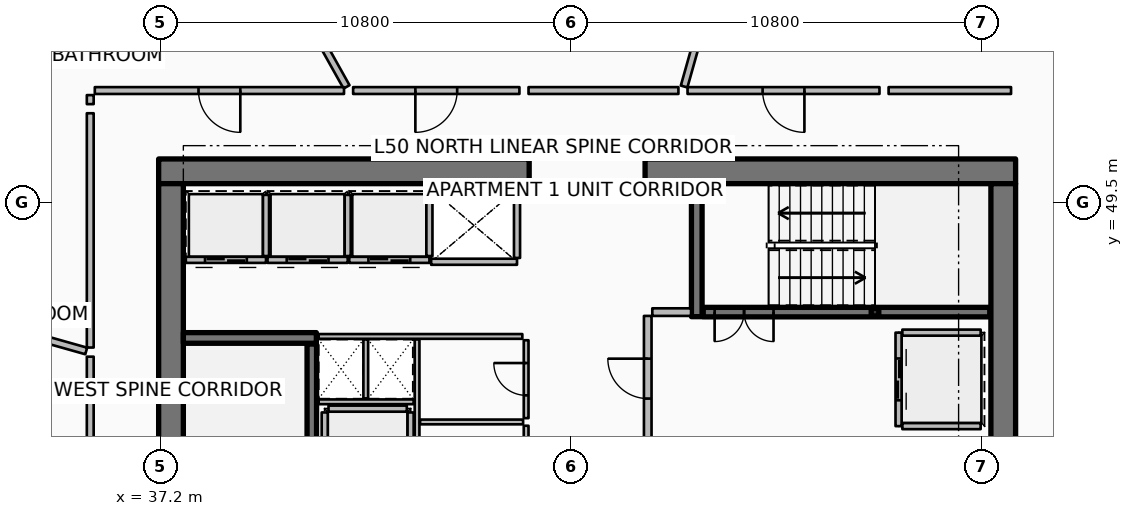
"""IFC4 building model, lengths in metres.
Left out: names, types, materials, properties, quantities, classifications, styles, units other than length and angle.
Written with IfcOpenShell. Run it as: python <this file> out.ifc"""

import sys

from ifc_helpers import new_model, si_unit, direction, frame, frame_2d, origin, origin_2d, place, context, subcontext, project, spatial, rectangle, hollow_rectangle, extrude, element, fill, save


model = new_model("IFC4")
c1 = context("Model", 3, precision=1e-05, world=origin(), true_north=direction((0.0, 1.0)))
c2 = subcontext(c1, "Body", "Model", "MODEL_VIEW")
j1 = project(units=[si_unit("LENGTHUNIT", "METRE"), si_unit("PLANEANGLEUNIT", "RADIAN")], contexts=[c1])
p1 = place(None, origin())
s1 = spatial("IfcSite", under=j1, at=p1, CompositionType="ELEMENT")
p2 = place(p1, origin())
s2 = spatial("IfcBuilding", under=s1, at=p2, CompositionType="ELEMENT")
p3 = place(p2, frame((0.0, 0.0, 199.05)))
s3 = spatial("IfcBuildingStorey", under=s2, at=p3, CompositionType="ELEMENT", Elevation=199.05)
for number, where, z_axis, x_axis in (
    (1, (37.15, 50.325, 0.0), (0.0, 0.0, 1.0), (1.0, 0.0, 0.0)),
    (2, (49.95, 50.325, 0.0), (0.0, 0.0, 1.0), (1.0, 0.0, 0.0)),
):
    element("IfcWall", number, at=place(p3, frame(where, z_axis=z_axis, x_axis=x_axis)), inside=s3, PredefinedType="SHEAR", context=c2, shape_type="SweptSolid", body=[
        extrude(rectangle(XDim=9.75, YDim=0.65, at=frame_2d((4.875, 0.0))), origin(), (0.0, 0.0, 1.0), 3.75),
    ])
for number, where, z_axis, x_axis in (
    (3, (37.475, 34.0, 0.0), (0.0, 0.0, 1.0), (0.0, 1.0, 0.0)),
    (4, (59.375, 34.0, 0.0), (0.0, 0.0, 1.0), (0.0, 1.0, 0.0)),
):
    element("IfcWall", number, at=place(p3, frame(where, z_axis=z_axis, x_axis=x_axis)), inside=s3, PredefinedType="SHEAR", context=c2, shape_type="SweptSolid", body=[
        extrude(rectangle(XDim=16.0, YDim=0.65, at=frame_2d((8.0, 0.0))), origin(), (0.0, 0.0, 1.0), 3.75),
    ])
for number, where, z_axis, x_axis in (
    (5, (37.8, 45.94, 0.0), (0.0, 0.0, 1.0), (1.0, 0.0, 0.0)),
    (6, (51.31, 46.5, 0.0), (0.0, 0.0, 1.0), (0.0, 1.0, 0.0)),
):
    element("IfcWall", number, at=place(p3, frame(where, z_axis=z_axis, x_axis=x_axis)), inside=s3, PredefinedType="SHEAR", context=c2, shape_type="SweptSolid", body=[
        extrude(rectangle(XDim=3.5, YDim=0.28, at=frame_2d((1.75, 0.0))), origin(), (0.0, 0.0, 1.0), 3.75),
    ])
p4 = place(p3, frame((56.0, 46.62, 0.0), z_axis=(0.0, 0.0, 1.0), x_axis=(1.0, 0.0, 0.0)))
e7 = element("IfcColumn", 7, at=p4, inside=s3, PredefinedType="COLUMN", context=c2, shape_type="SweptSolid", body=[
    extrude(hollow_rectangle(XDim=0.2, YDim=0.2, WallThickness=0.01, InnerFilletRadius=0.01, OuterFilletRadius=0.02, at=origin_2d()), origin(), (0.0, 0.0, 1.0), 1.67),
])
p5 = place(p3, frame((41.18, 38.22, 0.0), z_axis=(0.0, 0.0, 1.0), x_axis=(0.0, 1.0, 0.0)))
e8 = element("IfcWall", 8, at=p5, inside=s3, PredefinedType="SOLIDWALL", context=c2, shape_type="SweptSolid", body=[
    extrude(rectangle(XDim=7.56, YDim=0.25, at=frame_2d((3.78, 0.0))), origin(), (0.0, 0.0, 1.0), 3.5),
])
p6 = place(p5, frame((0.3, 0.0, 0.0)))
e9 = element("IfcOpeningElement", 9, at=p6, cuts=e8, PredefinedType="OPENING", context=c2, shape_type="SweptSolid", body=[
    extrude(rectangle(XDim=1.55, YDim=2.15, at=frame_2d((0.775, 1.075))), frame((0.0, 0.135, 0.0), z_axis=(0.0, -1.0, 0.0), x_axis=(1.0, 0.0, 0.0)), (0.0, 0.0, 1.0), 0.27),
])
p7 = place(p3, frame((51.48, 46.62, 0.0), z_axis=(0.0, 0.0, 1.0), x_axis=(1.0, 0.0, 0.0)))
e10 = element("IfcWall", 10, at=p7, inside=s3, PredefinedType="SOLIDWALL", context=c2, shape_type="SweptSolid", body=[
    extrude(rectangle(XDim=7.54, YDim=0.25, at=frame_2d((3.77, 0.0))), origin(), (0.0, 0.0, 1.0), 3.5),
])
p8 = place(p7, frame((0.3, 0.0, 0.0)))
e11 = element("IfcOpeningElement", 11, at=p8, cuts=e10, PredefinedType="OPENING", context=c2, shape_type="SweptSolid", body=[
    extrude(rectangle(XDim=1.55, YDim=2.15, at=frame_2d((0.775, 1.075))), frame((0.0, 0.135, 0.0), z_axis=(0.0, -1.0, 0.0), x_axis=(1.0, 0.0, 0.0)), (0.0, 0.0, 1.0), 0.27),
])
p9 = place(p3, frame((39.975, 47.995, 0.0), z_axis=(0.0, 0.0, 1.0), x_axis=(-1.0, 0.0, 0.0)))
e12 = element("IfcWall", 12, at=p9, inside=s3, PredefinedType="PARTITIONING", context=c2, shape_type="SweptSolid", body=[
    extrude(rectangle(XDim=2.11, YDim=0.16, at=frame_2d((1.055, 0.0))), origin(), (0.0, 0.0, 1.0), 3.5),
])
p10 = place(p9, frame((0.505, 0.0, 0.0)))
e13 = element("IfcOpeningElement", 13, at=p10, cuts=e12, PredefinedType="OPENING", context=c2, shape_type="SweptSolid", body=[
    extrude(rectangle(XDim=1.1, YDim=2.1, at=frame_2d((0.55, 1.05))), frame((0.0, 0.09, 0.0), z_axis=(0.0, -1.0, 0.0), x_axis=(1.0, 0.0, 0.0)), (0.0, 0.0, 1.0), 0.18),
])
p11 = place(p3, frame((39.975, 48.095, 0.0), z_axis=(0.0, 0.0, 1.0), x_axis=(0.0, 1.0, 0.0)))
e14 = element("IfcWall", 14, at=p11, inside=s3, PredefinedType="PARTITIONING", context=c2, shape_type="SweptSolid", body=[
    extrude(rectangle(XDim=1.61, YDim=0.16, at=frame_2d((0.805, 0.0))), origin(), (0.0, 0.0, 1.0), 3.5),
])
p12 = place(p3, frame((42.125, 47.995, 0.0), z_axis=(0.0, 0.0, 1.0), x_axis=(-1.0, 0.0, 0.0)))
e15 = element("IfcWall", 15, at=p12, inside=s3, PredefinedType="PARTITIONING", context=c2, shape_type="SweptSolid", body=[
    extrude(rectangle(XDim=2.11, YDim=0.16, at=frame_2d((1.055, 0.0))), origin(), (0.0, 0.0, 1.0), 3.5),
])
p13 = place(p12, frame((0.505, 0.0, 0.0)))
e16 = element("IfcOpeningElement", 16, at=p13, cuts=e15, PredefinedType="OPENING", context=c2, shape_type="SweptSolid", body=[
    extrude(rectangle(XDim=1.1, YDim=2.1, at=frame_2d((0.55, 1.05))), frame((0.0, 0.09, 0.0), z_axis=(0.0, -1.0, 0.0), x_axis=(1.0, 0.0, 0.0)), (0.0, 0.0, 1.0), 0.18),
])
p14 = place(p3, frame((42.125, 48.095, 0.0), z_axis=(0.0, 0.0, 1.0), x_axis=(0.0, 1.0, 0.0)))
e17 = element("IfcWall", 17, at=p14, inside=s3, PredefinedType="PARTITIONING", context=c2, shape_type="SweptSolid", body=[
    extrude(rectangle(XDim=1.61, YDim=0.16, at=frame_2d((0.805, 0.0))), origin(), (0.0, 0.0, 1.0), 3.5),
])
p15 = place(p3, frame((44.275, 47.995, 0.0), z_axis=(0.0, 0.0, 1.0), x_axis=(-1.0, 0.0, 0.0)))
e18 = element("IfcWall", 18, at=p15, inside=s3, PredefinedType="PARTITIONING", context=c2, shape_type="SweptSolid", body=[
    extrude(rectangle(XDim=2.11, YDim=0.16, at=frame_2d((1.055, 0.0))), origin(), (0.0, 0.0, 1.0), 3.5),
])
p16 = place(p15, frame((0.505, 0.0, 0.0)))
e19 = element("IfcOpeningElement", 19, at=p16, cuts=e18, PredefinedType="OPENING", context=c2, shape_type="SweptSolid", body=[
    extrude(rectangle(XDim=1.1, YDim=2.1, at=frame_2d((0.55, 1.05))), frame((0.0, 0.09, 0.0), z_axis=(0.0, -1.0, 0.0), x_axis=(1.0, 0.0, 0.0)), (0.0, 0.0, 1.0), 0.18),
])
p17 = place(p3, frame((44.275, 48.095, 0.0), z_axis=(0.0, 0.0, 1.0), x_axis=(0.0, 1.0, 0.0)))
e20 = element("IfcWall", 20, at=p17, inside=s3, PredefinedType="PARTITIONING", context=c2, shape_type="SweptSolid", body=[
    extrude(rectangle(XDim=1.61, YDim=0.16, at=frame_2d((0.805, 0.0))), origin(), (0.0, 0.0, 1.0), 3.5),
])
p18 = place(p3, frame((46.58, 47.945, 0.0), z_axis=(0.0, 0.0, 1.0), x_axis=(-1.0, 0.0, 0.0)))
e21 = element("IfcWall", 21, at=p18, inside=s3, PredefinedType="PARTITIONING", context=c2, shape_type="SweptSolid", body=[
    extrude(rectangle(XDim=2.26, YDim=0.16, at=frame_2d((1.13, 0.0))), origin(), (0.0, 0.0, 1.0), 3.5),
])
p19 = place(p3, frame((46.58, 48.045, 0.0), z_axis=(0.0, 0.0, 1.0), x_axis=(0.0, 1.0, 0.0)))
e22 = element("IfcWall", 22, at=p19, inside=s3, PredefinedType="PARTITIONING", context=c2, shape_type="SweptSolid", body=[
    extrude(rectangle(XDim=1.71, YDim=0.16, at=frame_2d((0.855, 0.0))), origin(), (0.0, 0.0, 1.0), 3.5),
])
for number, where, z_axis, x_axis in (
    (23, (43.78, 41.72, 0.0), (0.0, 0.0, 1.0), (0.0, 1.0, 0.0)),
    (24, (41.52, 41.72, 0.0), (0.0, 0.0, 1.0), (0.0, 1.0, 0.0)),
):
    element("IfcWall", number, at=place(p3, frame(where, z_axis=z_axis, x_axis=x_axis)), inside=s3, PredefinedType="PARTITIONING", context=c2, shape_type="SweptSolid", body=[
        extrude(rectangle(XDim=2.26, YDim=0.16, at=frame_2d((1.13, 0.0))), origin(), (0.0, 0.0, 1.0), 3.5),
    ])
p20 = place(p3, frame((41.62, 44.08, 0.0), z_axis=(0.0, 0.0, 1.0), x_axis=(1.0, 0.0, 0.0)))
e25 = element("IfcWall", 25, at=p20, inside=s3, PredefinedType="PARTITIONING", context=c2, shape_type="SweptSolid", body=[
    extrude(rectangle(XDim=2.06, YDim=0.16, at=frame_2d((1.03, 0.0))), origin(), (0.0, 0.0, 1.0), 3.5),
])
p21 = place(p3, frame((56.62, 46.08, 0.0), z_axis=(0.0, 0.0, 1.0), x_axis=(0.0, -1.0, 0.0)))
e26 = element("IfcWall", 26, at=p21, inside=s3, PredefinedType="PARTITIONING", context=c2, shape_type="SweptSolid", body=[
    extrude(rectangle(XDim=2.46, YDim=0.16, at=frame_2d((1.23, 0.0))), origin(), (0.0, 0.0, 1.0), 3.5),
])
p22 = place(p21, frame((0.68, 0.0, 0.0)))
e27 = element("IfcOpeningElement", 27, at=p22, cuts=e26, PredefinedType="OPENING", context=c2, shape_type="SweptSolid", body=[
    extrude(rectangle(XDim=1.1, YDim=2.1, at=frame_2d((0.55, 1.05))), frame((0.0, 0.09, 0.0), z_axis=(0.0, -1.0, 0.0), x_axis=(1.0, 0.0, 0.0)), (0.0, 0.0, 1.0), 0.18),
])
for number, where, z_axis, x_axis in (
    (28, (56.72, 46.08, 0.0), (0.0, 0.0, 1.0), (1.0, 0.0, 0.0)),
    (29, (56.72, 43.62, 0.0), (0.0, 0.0, 1.0), (1.0, 0.0, 0.0)),
):
    element("IfcWall", number, at=place(p3, frame(where, z_axis=z_axis, x_axis=x_axis)), inside=s3, PredefinedType="PARTITIONING", context=c2, shape_type="SweptSolid", body=[
        extrude(rectangle(XDim=2.06, YDim=0.16, at=frame_2d((1.03, 0.0))), origin(), (0.0, 0.0, 1.0), 3.5),
    ])
p23 = place(p3, frame((50.14, 46.62, 0.0), z_axis=(0.0, 0.0, 1.0), x_axis=(1.0, 0.0, 0.0)))
e30 = element("IfcWall", 30, at=p23, inside=s3, PredefinedType="PARTITIONING", context=c2, shape_type="SweptSolid", body=[
    extrude(rectangle(XDim=1.02, YDim=0.2, at=frame_2d((0.51, 0.0))), origin(), (0.0, 0.0, 1.0), 3.5),
])
p24 = place(p3, frame((50.02, 43.22, 0.0), z_axis=(0.0, 0.0, 1.0), x_axis=(0.0, 1.0, 0.0)))
e31 = element("IfcWall", 31, at=p24, inside=s3, PredefinedType="PARTITIONING", context=c2, shape_type="SweptSolid", body=[
    extrude(rectangle(XDim=3.3, YDim=0.2, at=frame_2d((1.65, 0.0))), origin(), (0.0, 0.0, 1.0), 3.5),
])
p25 = place(p24, frame((1.125, 0.0, 0.0)))
e32 = element("IfcOpeningElement", 32, at=p25, cuts=e31, PredefinedType="OPENING", context=c2, shape_type="SweptSolid", body=[
    extrude(rectangle(XDim=1.05, YDim=2.1, at=frame_2d((0.525, 1.05))), frame((0.0, 0.11, 0.0), z_axis=(0.0, -1.0, 0.0), x_axis=(1.0, 0.0, 0.0)), (0.0, 0.0, 1.0), 0.22),
])
p26 = place(p3, frame((41.36, 45.98, 0.0), z_axis=(0.0, 0.0, 1.0), x_axis=(1.0, 0.0, 0.0)))
e33 = element("IfcWall", 33, at=p26, inside=s3, PredefinedType="PARTITIONING", context=c2, shape_type="SweptSolid", body=[
    extrude(rectangle(XDim=5.36, YDim=0.125, at=frame_2d((2.68, 0.0))), origin(), (0.0, 0.0, 1.0), 2.94),
])
p27 = place(p3, frame((41.36, 44.26, 0.0), z_axis=(0.0, 0.0, 1.0), x_axis=(1.0, 0.0, 0.0)))
e34 = element("IfcWall", 34, at=p27, inside=s3, PredefinedType="PARTITIONING", context=c2, shape_type="SweptSolid", body=[
    extrude(rectangle(XDim=2.5, YDim=0.125, at=frame_2d((1.25, 0.0))), origin(), (0.0, 0.0, 1.0), 2.94),
])
p28 = place(p3, frame((42.6, 44.35, 0.0), z_axis=(0.0, 0.0, 1.0), x_axis=(0.0, 1.0, 0.0)))
e35 = element("IfcWall", 35, at=p28, inside=s3, PredefinedType="PARTITIONING", context=c2, shape_type="SweptSolid", body=[
    extrude(rectangle(XDim=1.55, YDim=0.125, at=frame_2d((0.775, 0.0))), origin(), (0.0, 0.0, 1.0), 2.94),
])
p29 = place(p3, frame((43.95, 41.58, 0.0), z_axis=(0.0, 0.0, 1.0), x_axis=(0.0, 1.0, 0.0)))
e36 = element("IfcWall", 36, at=p29, inside=s3, PredefinedType="PARTITIONING", context=c2, shape_type="SweptSolid", body=[
    extrude(rectangle(XDim=4.32, YDim=0.125, at=frame_2d((2.16, 0.0))), origin(), (0.0, 0.0, 1.0), 2.94),
])
p30 = place(p3, frame((44.03, 43.73, 0.0), z_axis=(0.0, 0.0, 1.0), x_axis=(1.0, 0.0, 0.0)))
e37 = element("IfcWall", 37, at=p30, inside=s3, PredefinedType="PARTITIONING", context=c2, shape_type="SweptSolid", body=[
    extrude(rectangle(XDim=2.71, YDim=0.125, at=frame_2d((1.355, 0.0))), origin(), (0.0, 0.0, 1.0), 2.94),
])
p31 = place(p3, frame((46.82, 41.58, 0.0), z_axis=(0.0, 0.0, 1.0), x_axis=(0.0, 1.0, 0.0)))
e38 = element("IfcWall", 38, at=p31, inside=s3, PredefinedType="PARTITIONING", context=c2, shape_type="SweptSolid", body=[
    extrude(rectangle(XDim=2.05, YDim=0.125, at=frame_2d((1.025, 0.0))), origin(), (0.0, 0.0, 1.0), 2.94),
])
p32 = place(p31, frame((0.6, 0.0, 0.0)))
e39 = element("IfcOpeningElement", 39, at=p32, cuts=e38, PredefinedType="OPENING", context=c2, shape_type="SweptSolid", body=[
    extrude(rectangle(XDim=0.85, YDim=2.06, at=frame_2d((0.425, 1.03))), frame((0.0, 0.073, 0.0), z_axis=(0.0, -1.0, 0.0), x_axis=(1.0, 0.0, 0.0)), (0.0, 0.0, 1.0), 0.145),
])
p33 = place(p3, frame((46.82, 43.83, 0.0), z_axis=(0.0, 0.0, 1.0), x_axis=(0.0, 1.0, 0.0)))
e40 = element("IfcWall", 40, at=p33, inside=s3, PredefinedType="PARTITIONING", context=c2, shape_type="SweptSolid", body=[
    extrude(rectangle(XDim=2.05, YDim=0.125, at=frame_2d((1.025, 0.0))), origin(), (0.0, 0.0, 1.0), 2.94),
])
p34 = place(p33, frame((0.6, 0.0, 0.0)))
e41 = element("IfcOpeningElement", 41, at=p34, cuts=e40, PredefinedType="OPENING", context=c2, shape_type="SweptSolid", body=[
    extrude(rectangle(XDim=0.85, YDim=2.06, at=frame_2d((0.425, 1.03))), frame((0.0, 0.073, 0.0), z_axis=(0.0, -1.0, 0.0), x_axis=(1.0, 0.0, 0.0)), (0.0, 0.0, 1.0), 0.145),
])
p35 = place(p3, frame((50.977, 52.556, 0.0), z_axis=(0.0, 0.0, 1.0), x_axis=(0.271443307373, 0.962454430548, 0.0)))
e42 = element("IfcWall", 42, at=p35, inside=s3, PredefinedType="PARTITIONING", context=c2, shape_type="SweptSolid", body=[
    extrude(rectangle(XDim=13.759, YDim=0.18, at=frame_2d((6.88, 0.0))), origin(), (0.0, 0.0, 1.0), 2.94),
])
p36 = place(p3, frame((42.094, 52.546, 0.0), z_axis=(0.0, 0.0, 1.0), x_axis=(-0.488614041717, 0.872500039104, 0.0)))
e43 = element("IfcWall", 43, at=p36, inside=s3, PredefinedType="PARTITIONING", context=c2, shape_type="SweptSolid", body=[
    extrude(rectangle(XDim=10.448, YDim=0.18, at=frame_2d((5.224, 0.0))), origin(), (0.0, 0.0, 1.0), 2.94),
])
p37 = place(p3, frame((35.244, 45.598, 0.0), z_axis=(0.0, 0.0, 1.0), x_axis=(-0.962456561262, 0.271435752405, 0.0)))
e44 = element("IfcWall", 44, at=p37, inside=s3, PredefinedType="PARTITIONING", context=c2, shape_type="SweptSolid", body=[
    extrude(rectangle(XDim=13.777, YDim=0.18, at=frame_2d((6.888, 0.0))), origin(), (0.0, 0.0, 1.0), 2.94),
])
p38 = place(p3, frame((46.643, 52.45, 0.0), z_axis=(0.0, 0.0, 1.0), x_axis=(-1.0, 0.0, 0.0)))
e45 = element("IfcWall", 45, at=p38, inside=s3, PredefinedType="PARTITIONING", context=c2, shape_type="SweptSolid", body=[
    extrude(rectangle(XDim=4.376, YDim=0.18, at=frame_2d((2.188, 0.0))), origin(), (0.0, 0.0, 1.0), 2.94),
])
p39 = place(p38, frame((1.638, 0.0, 0.0)))
e46 = element("IfcOpeningElement", 46, at=p39, cuts=e45, PredefinedType="OPENING", context=c2, shape_type="SweptSolid", body=[
    extrude(rectangle(XDim=1.1, YDim=2.1, at=frame_2d((0.55, 1.05))), frame((0.0, 0.1, 0.0), z_axis=(0.0, -1.0, 0.0), x_axis=(1.0, 0.0, 0.0)), (0.0, 0.0, 1.0), 0.2),
])
p40 = place(p3, frame((50.827, 52.45, 0.0), z_axis=(0.0, 0.0, 1.0), x_axis=(-1.0, 0.0, 0.0)))
e47 = element("IfcWall", 47, at=p40, inside=s3, PredefinedType="PARTITIONING", context=c2, shape_type="SweptSolid", body=[
    extrude(rectangle(XDim=3.944, YDim=0.18, at=frame_2d((1.972, 0.0))), origin(), (0.0, 0.0, 1.0), 2.94),
])
p41 = place(p3, frame((42.028, 52.45, 0.0), z_axis=(0.0, 0.0, 1.0), x_axis=(-1.0, 0.0, 0.0)))
e48 = element("IfcWall", 48, at=p41, inside=s3, PredefinedType="PARTITIONING", context=c2, shape_type="SweptSolid", body=[
    extrude(rectangle(XDim=6.558, YDim=0.18, at=frame_2d((3.279, 0.0))), origin(), (0.0, 0.0, 1.0), 2.94),
])
p42 = place(p41, frame((2.729, 0.0, 0.0)))
e49 = element("IfcOpeningElement", 49, at=p42, cuts=e48, PredefinedType="OPENING", context=c2, shape_type="SweptSolid", body=[
    extrude(rectangle(XDim=1.1, YDim=2.1, at=frame_2d((0.55, 1.05))), frame((0.0, 0.1, 0.0), z_axis=(0.0, -1.0, 0.0), x_axis=(1.0, 0.0, 0.0)), (0.0, 0.0, 1.0), 0.2),
])
p43 = place(p3, frame((35.35, 52.33, 0.0), z_axis=(0.0, 0.0, 1.0), x_axis=(0.0, -1.0, 0.0)))
e50 = element("IfcWall", 50, at=p43, inside=s3, PredefinedType="PARTITIONING", context=c2, shape_type="SweptSolid", body=[
    extrude(rectangle(XDim=0.238, YDim=0.18, at=frame_2d((0.119, 0.0))), origin(), (0.0, 0.0, 1.0), 2.94),
])
p44 = place(p3, frame((35.35, 51.853, 0.0), z_axis=(0.0, 0.0, 1.0), x_axis=(0.0, -1.0, 0.0)))
e51 = element("IfcWall", 51, at=p44, inside=s3, PredefinedType="PARTITIONING", context=c2, shape_type="SweptSolid", body=[
    extrude(rectangle(XDim=6.165, YDim=0.18, at=frame_2d((3.083, 0.0))), origin(), (0.0, 0.0, 1.0), 2.94),
])
p45 = place(p3, frame((35.35, 45.448, 0.0), z_axis=(0.0, 0.0, 1.0), x_axis=(0.0, -1.0, 0.0)))
e52 = element("IfcWall", 52, at=p45, inside=s3, PredefinedType="PARTITIONING", context=c2, shape_type="SweptSolid", body=[
    extrude(rectangle(XDim=4.825, YDim=0.18, at=frame_2d((2.413, 0.0))), origin(), (0.0, 0.0, 1.0), 2.94),
])
p46 = place(p3, frame((56.118, 52.45, 0.0), z_axis=(0.0, 0.0, 1.0), x_axis=(-1.0, 0.0, 0.0)))
e53 = element("IfcWall", 53, at=p46, inside=s3, PredefinedType="PARTITIONING", context=c2, shape_type="SweptSolid", body=[
    extrude(rectangle(XDim=5.051, YDim=0.18, at=frame_2d((2.525, 0.0))), origin(), (0.0, 0.0, 1.0), 2.94),
])
p47 = place(p46, frame((1.975, 0.0, 0.0)))
e54 = element("IfcOpeningElement", 54, at=p47, cuts=e53, PredefinedType="OPENING", context=c2, shape_type="SweptSolid", body=[
    extrude(rectangle(XDim=1.1, YDim=2.1, at=frame_2d((0.55, 1.05))), frame((0.0, 0.1, 0.0), z_axis=(0.0, -1.0, 0.0), x_axis=(1.0, 0.0, 0.0)), (0.0, 0.0, 1.0), 0.2),
])
p48 = place(p3, frame((59.58, 52.45, 0.0), z_axis=(0.0, 0.0, 1.0), x_axis=(-1.0, 0.0, 0.0)))
e55 = element("IfcWall", 55, at=p48, inside=s3, PredefinedType="PARTITIONING", context=c2, shape_type="SweptSolid", body=[
    extrude(rectangle(XDim=3.222, YDim=0.18, at=frame_2d((1.611, 0.0))), origin(), (0.0, 0.0, 1.0), 2.94),
])
p49 = place(p3, frame((62.853, 53.306, 0.0), z_axis=(0.0, 0.0, 1.0), x_axis=(-0.699562743434, 0.714571177699, 0.0)))
e56 = element("IfcWall", 56, at=p49, inside=s3, PredefinedType="PARTITIONING", context=c2, shape_type="SweptSolid", body=[
    extrude(rectangle(XDim=4.604, YDim=0.125, at=frame_2d((2.302, 0.0))), origin(), (0.0, 0.0, 1.0), 2.94),
])
p50 = place(p49, frame((1.852, 0.0, 0.0)))
e57 = element("IfcOpeningElement", 57, at=p50, cuts=e56, PredefinedType="OPENING", context=c2, shape_type="SweptSolid", body=[
    extrude(rectangle(XDim=0.9, YDim=2.08, at=frame_2d((0.45, 1.04))), frame((0.0, 0.073, 0.0), z_axis=(0.0, -1.0, 0.0), x_axis=(1.0, 0.0, 0.0)), (0.0, 0.0, 1.0), 0.145),
])
p51 = place(p8, origin())
e58 = element("IfcDoor", 58, at=p51, inside=s3, OperationType="DOUBLE_DOOR_SINGLE_SWING", PredefinedType="DOOR", context=c2, shape_type="SweptSolid", body=[
    extrude(rectangle(XDim=1.55, YDim=2.15, at=frame_2d((0.775, 1.075))), frame((0.0, 0.025, 0.0), z_axis=(0.0, -1.0, 0.0), x_axis=(1.0, 0.0, 0.0)), (0.0, 0.0, 1.0), 0.05),
])
fill(e11, e58)
p52 = place(p10, origin())
e59 = element("IfcDoor", 59, at=p52, inside=s3, OperationType="DOUBLE_DOOR_SLIDING", PredefinedType="DOOR", context=c2, shape_type="SweptSolid", body=[
    extrude(rectangle(XDim=1.1, YDim=2.1, at=frame_2d((0.55, 1.05))), frame((0.0, 0.025, 0.0), z_axis=(0.0, -1.0, 0.0), x_axis=(1.0, 0.0, 0.0)), (0.0, 0.0, 1.0), 0.05),
])
fill(e13, e59)
p53 = place(p13, origin())
e60 = element("IfcDoor", 60, at=p53, inside=s3, OperationType="DOUBLE_DOOR_SLIDING", PredefinedType="DOOR", context=c2, shape_type="SweptSolid", body=[
    extrude(rectangle(XDim=1.1, YDim=2.1, at=frame_2d((0.55, 1.05))), frame((0.0, 0.025, 0.0), z_axis=(0.0, -1.0, 0.0), x_axis=(1.0, 0.0, 0.0)), (0.0, 0.0, 1.0), 0.05),
])
fill(e16, e60)
p54 = place(p16, origin())
e61 = element("IfcDoor", 61, at=p54, inside=s3, OperationType="DOUBLE_DOOR_SLIDING", PredefinedType="DOOR", context=c2, shape_type="SweptSolid", body=[
    extrude(rectangle(XDim=1.1, YDim=2.1, at=frame_2d((0.55, 1.05))), frame((0.0, 0.025, 0.0), z_axis=(0.0, -1.0, 0.0), x_axis=(1.0, 0.0, 0.0)), (0.0, 0.0, 1.0), 0.05),
])
fill(e19, e61)
p55 = place(p22, origin())
e62 = element("IfcDoor", 62, at=p55, inside=s3, OperationType="DOUBLE_DOOR_SLIDING", PredefinedType="DOOR", context=c2, shape_type="SweptSolid", body=[
    extrude(rectangle(XDim=1.1, YDim=2.1, at=frame_2d((0.55, 1.05))), frame((0.0, 0.025, 0.0), z_axis=(0.0, -1.0, 0.0), x_axis=(1.0, 0.0, 0.0)), (0.0, 0.0, 1.0), 0.05),
])
fill(e27, e62)
p56 = place(p25, origin())
e63 = element("IfcDoor", 63, at=p56, inside=s3, OperationType="SINGLE_SWING_RIGHT", PredefinedType="DOOR", context=c2, shape_type="SweptSolid", body=[
    extrude(rectangle(XDim=1.05, YDim=2.1, at=frame_2d((0.525, 1.05))), frame((0.0, 0.025, 0.0), z_axis=(0.0, -1.0, 0.0), x_axis=(1.0, 0.0, 0.0)), (0.0, 0.0, 1.0), 0.05),
])
fill(e32, e63)
p57 = place(p34, origin())
e64 = element("IfcDoor", 64, at=p57, inside=s3, OperationType="SINGLE_SWING_RIGHT", PredefinedType="DOOR", context=c2, shape_type="SweptSolid", body=[
    extrude(rectangle(XDim=0.85, YDim=2.06, at=frame_2d((0.425, 1.03))), frame((0.0, 0.025, 0.0), z_axis=(0.0, -1.0, 0.0), x_axis=(1.0, 0.0, 0.0)), (0.0, 0.0, 1.0), 0.05),
])
fill(e41, e64)
p58 = place(p39, origin())
e65 = element("IfcDoor", 65, at=p58, inside=s3, OperationType="SINGLE_SWING_RIGHT", PredefinedType="DOOR", context=c2, shape_type="SweptSolid", body=[
    extrude(rectangle(XDim=1.1, YDim=2.1, at=frame_2d((0.55, 1.05))), frame((0.0, 0.025, 0.0), z_axis=(0.0, -1.0, 0.0), x_axis=(1.0, 0.0, 0.0)), (0.0, 0.0, 1.0), 0.05),
])
fill(e46, e65)
p59 = place(p42, origin())
e66 = element("IfcDoor", 66, at=p59, inside=s3, OperationType="SINGLE_SWING_LEFT", PredefinedType="DOOR", context=c2, shape_type="SweptSolid", body=[
    extrude(rectangle(XDim=1.1, YDim=2.1, at=frame_2d((0.55, 1.05))), frame((0.0, 0.025, 0.0), z_axis=(0.0, -1.0, 0.0), x_axis=(1.0, 0.0, 0.0)), (0.0, 0.0, 1.0), 0.05),
])
fill(e49, e66)
p60 = place(p47, origin())
e67 = element("IfcDoor", 67, at=p60, inside=s3, OperationType="SINGLE_SWING_LEFT", PredefinedType="DOOR", context=c2, shape_type="SweptSolid", body=[
    extrude(rectangle(XDim=1.1, YDim=2.1, at=frame_2d((0.55, 1.05))), frame((0.0, 0.025, 0.0), z_axis=(0.0, -1.0, 0.0), x_axis=(1.0, 0.0, 0.0)), (0.0, 0.0, 1.0), 0.05),
])
fill(e54, e67)
save(model, sys.argv[1])
